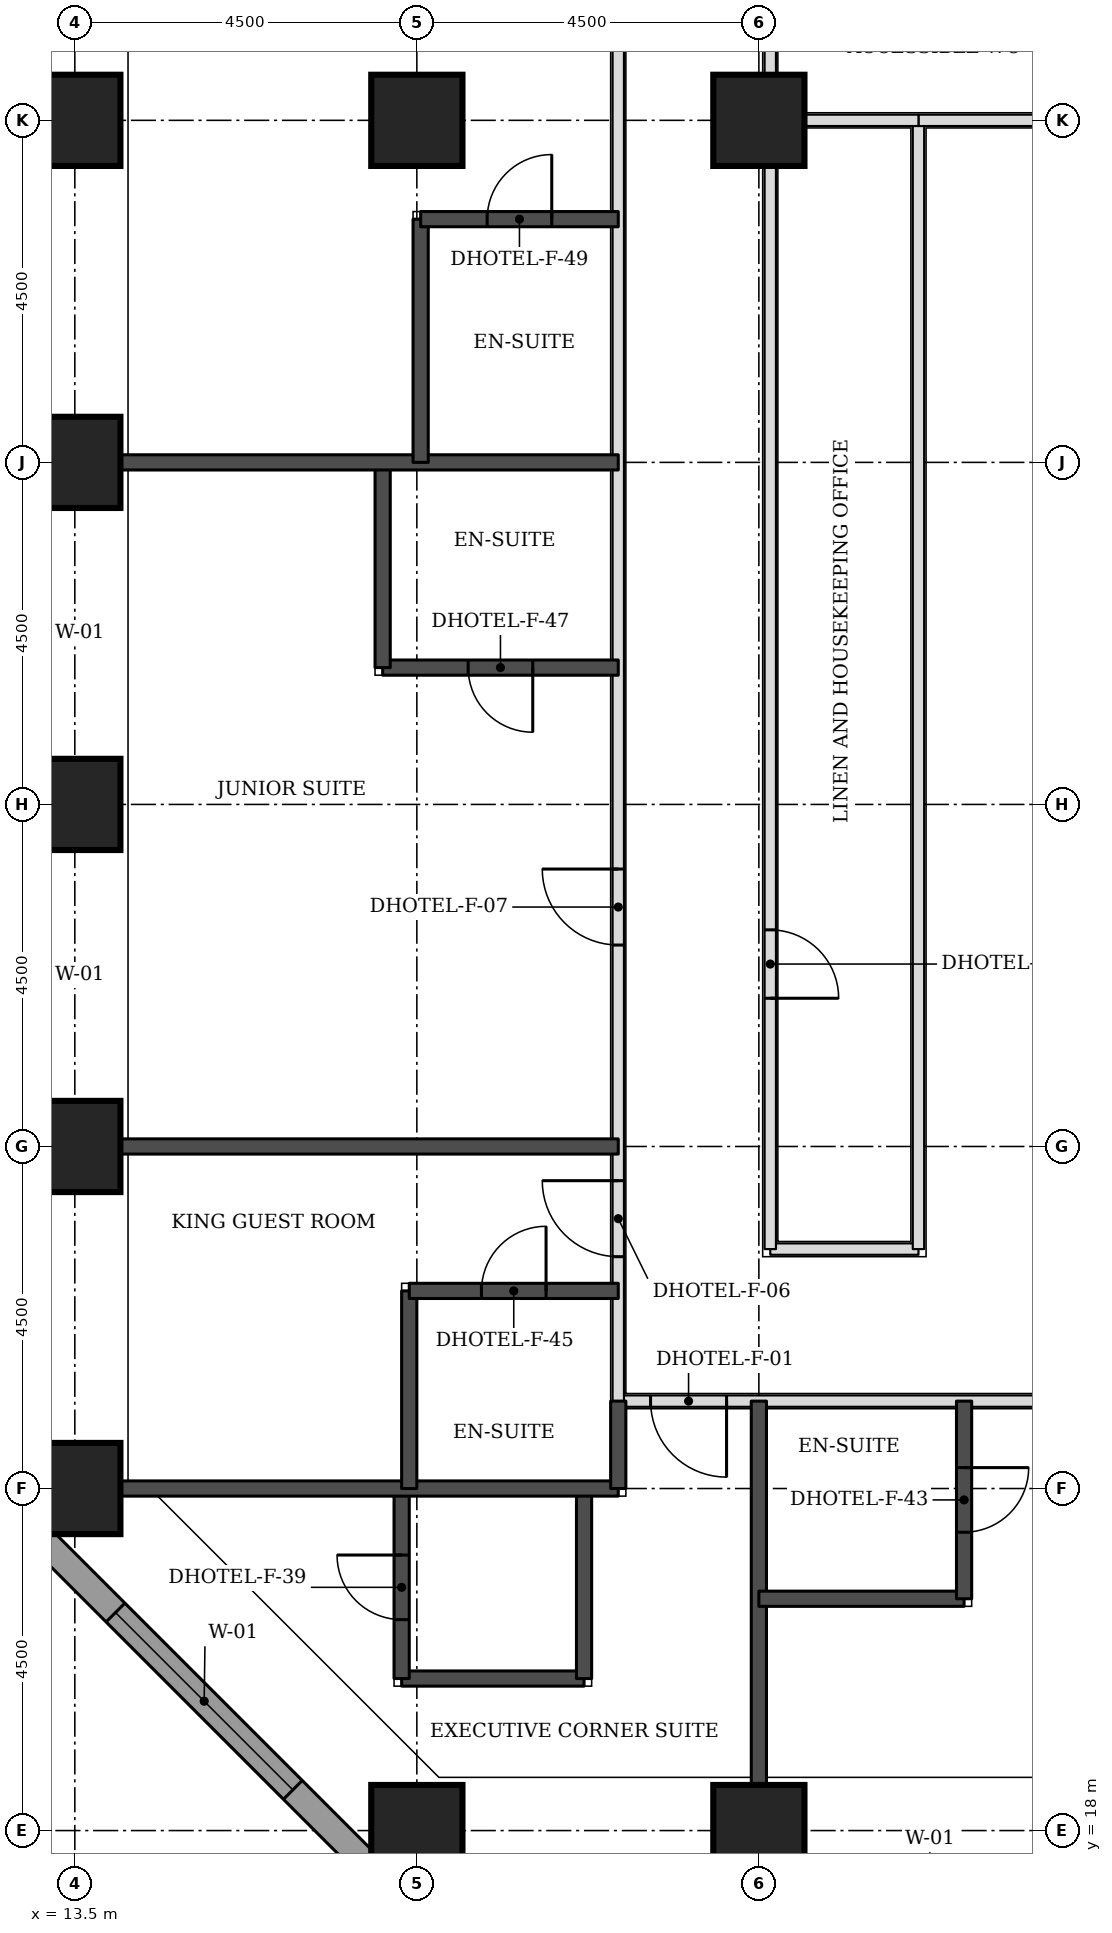
"""IFC4 building model, lengths in metres.
Left out: names, types, materials, properties, quantities, classifications, styles, units other than length and angle.
Written with IfcOpenShell. Run it as: python <this file> out.ifc"""

import sys

from ifc_helpers import new_model, si_unit, direction, frame, frame_2d, origin, origin_2d, place, context, subcontext, project, spatial, rectangle, extrude, element, fill, save


model = new_model("IFC4")
c1 = context("Model", 3, precision=1e-05, world=origin(), true_north=direction((0.0, 1.0)))
c2 = subcontext(c1, "Body", "Model", "MODEL_VIEW")
j1 = project(units=[si_unit("LENGTHUNIT", "METRE"), si_unit("PLANEANGLEUNIT", "RADIAN")], contexts=[c1])
p1 = place(None, origin())
s1 = spatial("IfcSite", under=j1, at=p1, CompositionType="ELEMENT")
p2 = place(p1, origin())
s2 = spatial("IfcBuilding", under=s1, at=p2, CompositionType="ELEMENT")
p3 = place(p2, frame((0.0, 0.0, 42.9)))
s3 = spatial("IfcBuildingStorey", under=s2, at=p3, CompositionType="ELEMENT", Elevation=42.9)
for number, where, z_axis, x_axis in (
    (1, (18.0, 18.0, 0.0), (0.0, 0.0, 1.0), (1.0, 0.0, 0.0)),
    (2, (22.5, 18.0, 0.0), (0.0, 0.0, 1.0), (1.0, 0.0, 0.0)),
    (3, (13.5, 22.5, 0.0), (0.0, 0.0, 1.0), (1.0, 0.0, 0.0)),
    (4, (13.5, 27.0, 0.0), (0.0, 0.0, 1.0), (1.0, 0.0, 0.0)),
    (5, (13.5, 31.5, 0.0), (0.0, 0.0, 1.0), (1.0, 0.0, 0.0)),
    (6, (13.5, 36.0, 0.0), (0.0, 0.0, 1.0), (1.0, 0.0, 0.0)),
    (7, (13.5, 40.5, 0.0), (0.0, 0.0, 1.0), (1.0, 0.0, 0.0)),
    (8, (18.0, 40.5, 0.0), (0.0, 0.0, 1.0), (1.0, 0.0, 0.0)),
    (9, (22.5, 40.5, 0.0), (0.0, 0.0, 1.0), (1.0, 0.0, 0.0)),
):
    element("IfcColumn", number, at=place(p3, frame(where, z_axis=z_axis, x_axis=x_axis)), inside=s3, PredefinedType="COLUMN", context=c2, shape_type="SweptSolid", body=[
        extrude(rectangle(XDim=1.2, YDim=1.2, at=origin_2d()), origin(), (0.0, 0.0, 1.0), 3.3),
    ])
p4 = place(p3, frame((12.674, 22.23, 0.0), z_axis=(0.0, 0.0, 1.0), x_axis=(0.707106781187, -0.707106781187, 0.0)))
e10 = element("IfcWall", 10, at=p4, inside=s3, PredefinedType="STANDARD", context=c2, shape_type="SweptSolid", body=[
    extrude(rectangle(XDim=7.151, YDim=0.35, at=frame_2d((3.576, 0.0))), origin(), (0.0, 0.0, 1.0), 3.055),
])
p5 = place(p4, frame((1.926, 0.0, 0.8)))
e11 = element("IfcOpeningElement", 11, at=p5, cuts=e10, PredefinedType="OPENING", context=c2, shape_type="SweptSolid", body=[
    extrude(rectangle(XDim=3.3, YDim=1.5, at=frame_2d((1.65, 0.75))), frame((0.0, 0.185, 0.0), z_axis=(0.0, -1.0, 0.0), x_axis=(1.0, 0.0, 0.0)), (0.0, 0.0, 1.0), 0.37),
])
p6 = place(p3, frame((20.65, 23.65, 0.0), z_axis=(0.0, 0.0, 1.0), x_axis=(1.0, 0.0, 0.0)))
e12 = element("IfcWall", 12, at=p6, inside=s3, PredefinedType="PARTITIONING", context=c2, shape_type="SweptSolid", body=[
    extrude(rectangle(XDim=30.85, YDim=0.15, at=frame_2d((15.425, 0.0))), origin(), (0.0, 0.0, 1.0), 3.08),
])
p7 = place(p6, frame((7.2, 0.0, 0.0)))
e13 = element("IfcOpeningElement", 13, at=p7, cuts=e12, PredefinedType="OPENING", context=c2, shape_type="SweptSolid", body=[
    extrude(rectangle(XDim=1.0, YDim=2.1, at=frame_2d((0.5, 1.05))), frame((0.0, 0.085, 0.0), z_axis=(0.0, -1.0, 0.0), x_axis=(1.0, 0.0, 0.0)), (0.0, 0.0, 1.0), 0.17),
])
p8 = place(p6, frame((13.25, 0.0, 0.0)))
e14 = element("IfcOpeningElement", 14, at=p8, cuts=e12, PredefinedType="OPENING", context=c2, shape_type="SweptSolid", body=[
    extrude(rectangle(XDim=1.0, YDim=2.1, at=frame_2d((0.5, 1.05))), frame((0.0, 0.085, 0.0), z_axis=(0.0, -1.0, 0.0), x_axis=(1.0, 0.0, 0.0)), (0.0, 0.0, 1.0), 0.17),
])
p9 = place(p6, frame((25.2, 0.0, 0.0)))
e15 = element("IfcOpeningElement", 15, at=p9, cuts=e12, PredefinedType="OPENING", context=c2, shape_type="SweptSolid", body=[
    extrude(rectangle(XDim=1.0, YDim=2.1, at=frame_2d((0.5, 1.05))), frame((0.0, 0.085, 0.0), z_axis=(0.0, -1.0, 0.0), x_axis=(1.0, 0.0, 0.0)), (0.0, 0.0, 1.0), 0.17),
])
p10 = place(p6, frame((0.425, 0.0, 0.0)))
e16 = element("IfcOpeningElement", 16, at=p10, cuts=e12, PredefinedType="OPENING", context=c2, shape_type="SweptSolid", body=[
    extrude(rectangle(XDim=1.0, YDim=2.1, at=frame_2d((0.5, 1.05))), frame((0.0, 0.085, 0.0), z_axis=(0.0, -1.0, 0.0), x_axis=(1.0, 0.0, 0.0)), (0.0, 0.0, 1.0), 0.17),
])
p11 = place(p6, frame((29.35, 0.0, 0.0)))
e17 = element("IfcOpeningElement", 17, at=p11, cuts=e12, PredefinedType="OPENING", context=c2, shape_type="SweptSolid", body=[
    extrude(rectangle(XDim=1.0, YDim=2.1, at=frame_2d((0.5, 1.05))), frame((0.0, 0.085, 0.0), z_axis=(0.0, -1.0, 0.0), x_axis=(1.0, 0.0, 0.0)), (0.0, 0.0, 1.0), 0.17),
])
p12 = place(p3, frame((20.65, 23.65, 0.0), z_axis=(0.0, 0.0, 1.0), x_axis=(0.0, 1.0, 0.0)))
e18 = element("IfcWall", 18, at=p12, inside=s3, PredefinedType="PARTITIONING", context=c2, shape_type="SweptSolid", body=[
    extrude(rectangle(XDim=25.85, YDim=0.15, at=frame_2d((12.925, 0.0))), origin(), (0.0, 0.0, 1.0), 3.08),
])
p13 = place(p12, frame((1.9, 0.0, 0.0)))
e19 = element("IfcOpeningElement", 19, at=p13, cuts=e18, PredefinedType="OPENING", context=c2, shape_type="SweptSolid", body=[
    extrude(rectangle(XDim=1.0, YDim=2.1, at=frame_2d((0.5, 1.05))), frame((0.0, 0.085, 0.0), z_axis=(0.0, -1.0, 0.0), x_axis=(1.0, 0.0, 0.0)), (0.0, 0.0, 1.0), 0.17),
])
p14 = place(p12, frame((6.0, 0.0, 0.0)))
e20 = element("IfcOpeningElement", 20, at=p14, cuts=e18, PredefinedType="OPENING", context=c2, shape_type="SweptSolid", body=[
    extrude(rectangle(XDim=1.0, YDim=2.1, at=frame_2d((0.5, 1.05))), frame((0.0, 0.085, 0.0), z_axis=(0.0, -1.0, 0.0), x_axis=(1.0, 0.0, 0.0)), (0.0, 0.0, 1.0), 0.17),
])
p15 = place(p12, frame((17.95, 0.0, 0.0)))
e21 = element("IfcOpeningElement", 21, at=p15, cuts=e18, PredefinedType="OPENING", context=c2, shape_type="SweptSolid", body=[
    extrude(rectangle(XDim=1.0, YDim=2.1, at=frame_2d((0.5, 1.05))), frame((0.0, 0.085, 0.0), z_axis=(0.0, -1.0, 0.0), x_axis=(1.0, 0.0, 0.0)), (0.0, 0.0, 1.0), 0.17),
])
p16 = place(p12, frame((23.04, 0.0, 0.0)))
e22 = element("IfcOpeningElement", 22, at=p16, cuts=e18, PredefinedType="OPENING", context=c2, shape_type="SweptSolid", body=[
    extrude(rectangle(XDim=0.9, YDim=2.1, at=frame_2d((0.45, 1.05))), frame((0.0, 0.085, 0.0), z_axis=(0.0, -1.0, 0.0), x_axis=(1.0, 0.0, 0.0)), (0.0, 0.0, 1.0), 0.17),
])
p17 = place(p3, frame((22.65, 25.65, 0.0), z_axis=(0.0, 0.0, 1.0), x_axis=(1.0, 0.0, 0.0)))
e23 = element("IfcWall", 23, at=p17, inside=s3, PredefinedType="PARTITIONING", context=c2, shape_type="SweptSolid", body=[
    extrude(rectangle(XDim=1.95, YDim=0.15, at=frame_2d((0.975, 0.0))), origin(), (0.0, 0.0, 1.0), 3.08),
])
p18 = place(p3, frame((22.65, 25.65, 0.0), z_axis=(0.0, 0.0, 1.0), x_axis=(0.0, 1.0, 0.0)))
e24 = element("IfcWall", 24, at=p18, inside=s3, PredefinedType="PARTITIONING", context=c2, shape_type="SweptSolid", body=[
    extrude(rectangle(XDim=17.35, YDim=0.15, at=frame_2d((8.675, 0.0))), origin(), (0.0, 0.0, 1.0), 3.08),
])
p19 = place(p18, frame((3.3, 0.0, 0.0)))
e25 = element("IfcOpeningElement", 25, at=p19, cuts=e24, PredefinedType="OPENING", context=c2, shape_type="SweptSolid", body=[
    extrude(rectangle(XDim=0.9, YDim=2.1, at=frame_2d((0.45, 1.05))), frame((0.0, 0.085, 0.0), z_axis=(0.0, -1.0, 0.0), x_axis=(1.0, 0.0, 0.0)), (0.0, 0.0, 1.0), 0.17),
])
p20 = place(p3, frame((24.6, 25.65, 0.0), z_axis=(0.0, 0.0, 1.0), x_axis=(0.0, 1.0, 0.0)))
e26 = element("IfcWall", 26, at=p20, inside=s3, PredefinedType="PARTITIONING", context=c2, shape_type="SweptSolid", body=[
    extrude(rectangle(XDim=14.85, YDim=0.15, at=frame_2d((7.425, 0.0))), origin(), (0.0, 0.0, 1.0), 3.08),
])
p21 = place(p3, frame((24.6, 40.5, 0.0), z_axis=(0.0, 0.0, 1.0), x_axis=(1.0, 0.0, 0.0)))
e27 = element("IfcWall", 27, at=p21, inside=s3, PredefinedType="PARTITIONING", context=c2, shape_type="SweptSolid", body=[
    extrude(rectangle(XDim=2.35, YDim=0.15, at=frame_2d((1.175, 0.0))), origin(), (0.0, 0.0, 1.0), 2.33),
])
p22 = place(p3, frame((22.5, 18.6, 0.0), z_axis=(0.0, 0.0, 1.0), x_axis=(0.0, 1.0, 0.0)))
e28 = element("IfcWall", 28, at=p22, inside=s3, PredefinedType="SOLIDWALL", context=c2, shape_type="SweptSolid", body=[
    extrude(rectangle(XDim=5.05, YDim=0.2, at=frame_2d((2.525, 0.0))), origin(), (0.0, 0.0, 1.0), 3.08),
])
p23 = place(p3, frame((17.8, 20.0, 0.0), z_axis=(0.0, 0.0, 1.0), x_axis=(1.0, 0.0, 0.0)))
e29 = element("IfcWall", 29, at=p23, inside=s3, PredefinedType="SOLIDWALL", context=c2, shape_type="SweptSolid", body=[
    extrude(rectangle(XDim=2.4, YDim=0.2, at=frame_2d((1.2, 0.0))), origin(), (0.0, 0.0, 1.0), 3.08),
])
p24 = place(p3, frame((17.8, 20.0, 0.0), z_axis=(0.0, 0.0, 1.0), x_axis=(0.0, 1.0, 0.0)))
e30 = element("IfcWall", 30, at=p24, inside=s3, PredefinedType="SOLIDWALL", context=c2, shape_type="SweptSolid", body=[
    extrude(rectangle(XDim=2.5, YDim=0.2, at=frame_2d((1.25, 0.0))), origin(), (0.0, 0.0, 1.0), 3.08),
])
p25 = place(p24, frame((0.775, 0.0, 0.0)))
e31 = element("IfcOpeningElement", 31, at=p25, cuts=e30, PredefinedType="OPENING", context=c2, shape_type="SweptSolid", body=[
    extrude(rectangle(XDim=0.85, YDim=2.1, at=frame_2d((0.425, 1.05))), frame((0.0, 0.11, 0.0), z_axis=(0.0, -1.0, 0.0), x_axis=(1.0, 0.0, 0.0)), (0.0, 0.0, 1.0), 0.22),
])
p26 = place(p3, frame((20.2, 20.0, 0.0), z_axis=(0.0, 0.0, 1.0), x_axis=(0.0, 1.0, 0.0)))
e32 = element("IfcWall", 32, at=p26, inside=s3, PredefinedType="SOLIDWALL", context=c2, shape_type="SweptSolid", body=[
    extrude(rectangle(XDim=2.5, YDim=0.2, at=frame_2d((1.25, 0.0))), origin(), (0.0, 0.0, 1.0), 3.08),
])
p27 = place(p3, frame((22.5, 21.05, 0.0), z_axis=(0.0, 0.0, 1.0), x_axis=(1.0, 0.0, 0.0)))
e33 = element("IfcWall", 33, at=p27, inside=s3, PredefinedType="SOLIDWALL", context=c2, shape_type="SweptSolid", body=[
    extrude(rectangle(XDim=2.7, YDim=0.2, at=frame_2d((1.35, 0.0))), origin(), (0.0, 0.0, 1.0), 3.08),
])
p28 = place(p3, frame((25.2, 21.05, 0.0), z_axis=(0.0, 0.0, 1.0), x_axis=(0.0, 1.0, 0.0)))
e34 = element("IfcWall", 34, at=p28, inside=s3, PredefinedType="SOLIDWALL", context=c2, shape_type="SweptSolid", body=[
    extrude(rectangle(XDim=2.6, YDim=0.2, at=frame_2d((1.3, 0.0))), origin(), (0.0, 0.0, 1.0), 3.08),
])
p29 = place(p28, frame((0.875, 0.0, 0.0)))
e35 = element("IfcOpeningElement", 35, at=p29, cuts=e34, PredefinedType="OPENING", context=c2, shape_type="SweptSolid", body=[
    extrude(rectangle(XDim=0.85, YDim=2.1, at=frame_2d((0.425, 1.05))), frame((0.0, 0.11, 0.0), z_axis=(0.0, -1.0, 0.0), x_axis=(1.0, 0.0, 0.0)), (0.0, 0.0, 1.0), 0.22),
])
p30 = place(p3, frame((14.1, 22.5, 0.0), z_axis=(0.0, 0.0, 1.0), x_axis=(1.0, 0.0, 0.0)))
e36 = element("IfcWall", 36, at=p30, inside=s3, PredefinedType="SOLIDWALL", context=c2, shape_type="SweptSolid", body=[
    extrude(rectangle(XDim=6.55, YDim=0.2, at=frame_2d((3.275, 0.0))), origin(), (0.0, 0.0, 1.0), 3.08),
])
p31 = place(p3, frame((17.9, 22.5, 0.0), z_axis=(0.0, 0.0, 1.0), x_axis=(0.0, 1.0, 0.0)))
e37 = element("IfcWall", 37, at=p31, inside=s3, PredefinedType="SOLIDWALL", context=c2, shape_type="SweptSolid", body=[
    extrude(rectangle(XDim=2.6, YDim=0.2, at=frame_2d((1.3, 0.0))), origin(), (0.0, 0.0, 1.0), 3.08),
])
p32 = place(p3, frame((20.65, 22.5, 0.0), z_axis=(0.0, 0.0, 1.0), x_axis=(0.0, 1.0, 0.0)))
e38 = element("IfcWall", 38, at=p32, inside=s3, PredefinedType="SOLIDWALL", context=c2, shape_type="SweptSolid", body=[
    extrude(rectangle(XDim=1.15, YDim=0.2, at=frame_2d((0.575, 0.0))), origin(), (0.0, 0.0, 1.0), 3.08),
])
p33 = place(p3, frame((17.9, 25.1, 0.0), z_axis=(0.0, 0.0, 1.0), x_axis=(1.0, 0.0, 0.0)))
e39 = element("IfcWall", 39, at=p33, inside=s3, PredefinedType="SOLIDWALL", context=c2, shape_type="SweptSolid", body=[
    extrude(rectangle(XDim=2.75, YDim=0.2, at=frame_2d((1.375, 0.0))), origin(), (0.0, 0.0, 1.0), 3.08),
])
p34 = place(p33, frame((0.95, 0.0, 0.0)))
e40 = element("IfcOpeningElement", 40, at=p34, cuts=e39, PredefinedType="OPENING", context=c2, shape_type="SweptSolid", body=[
    extrude(rectangle(XDim=0.85, YDim=2.1, at=frame_2d((0.425, 1.05))), frame((0.0, 0.11, 0.0), z_axis=(0.0, -1.0, 0.0), x_axis=(1.0, 0.0, 0.0)), (0.0, 0.0, 1.0), 0.22),
])
p35 = place(p3, frame((14.1, 27.0, 0.0), z_axis=(0.0, 0.0, 1.0), x_axis=(1.0, 0.0, 0.0)))
e41 = element("IfcWall", 41, at=p35, inside=s3, PredefinedType="SOLIDWALL", context=c2, shape_type="SweptSolid", body=[
    extrude(rectangle(XDim=6.55, YDim=0.2, at=frame_2d((3.275, 0.0))), origin(), (0.0, 0.0, 1.0), 3.08),
])
p36 = place(p3, frame((17.55, 33.3, 0.0), z_axis=(0.0, 0.0, 1.0), x_axis=(1.0, 0.0, 0.0)))
e42 = element("IfcWall", 42, at=p36, inside=s3, PredefinedType="SOLIDWALL", context=c2, shape_type="SweptSolid", body=[
    extrude(rectangle(XDim=3.1, YDim=0.2, at=frame_2d((1.55, 0.0))), origin(), (0.0, 0.0, 1.0), 3.08),
])
p37 = place(p36, frame((1.125, 0.0, 0.0)))
e43 = element("IfcOpeningElement", 43, at=p37, cuts=e42, PredefinedType="OPENING", context=c2, shape_type="SweptSolid", body=[
    extrude(rectangle(XDim=0.85, YDim=2.1, at=frame_2d((0.425, 1.05))), frame((0.0, 0.11, 0.0), z_axis=(0.0, -1.0, 0.0), x_axis=(1.0, 0.0, 0.0)), (0.0, 0.0, 1.0), 0.22),
])
p38 = place(p3, frame((17.55, 33.3, 0.0), z_axis=(0.0, 0.0, 1.0), x_axis=(0.0, 1.0, 0.0)))
e44 = element("IfcWall", 44, at=p38, inside=s3, PredefinedType="SOLIDWALL", context=c2, shape_type="SweptSolid", body=[
    extrude(rectangle(XDim=2.7, YDim=0.2, at=frame_2d((1.35, 0.0))), origin(), (0.0, 0.0, 1.0), 3.08),
])
p39 = place(p3, frame((14.1, 36.0, 0.0), z_axis=(0.0, 0.0, 1.0), x_axis=(1.0, 0.0, 0.0)))
e45 = element("IfcWall", 45, at=p39, inside=s3, PredefinedType="SOLIDWALL", context=c2, shape_type="SweptSolid", body=[
    extrude(rectangle(XDim=6.55, YDim=0.2, at=frame_2d((3.275, 0.0))), origin(), (0.0, 0.0, 1.0), 3.08),
])
p40 = place(p3, frame((18.05, 36.0, 0.0), z_axis=(0.0, 0.0, 1.0), x_axis=(0.0, 1.0, 0.0)))
e46 = element("IfcWall", 46, at=p40, inside=s3, PredefinedType="SOLIDWALL", context=c2, shape_type="SweptSolid", body=[
    extrude(rectangle(XDim=3.2, YDim=0.2, at=frame_2d((1.6, 0.0))), origin(), (0.0, 0.0, 1.0), 3.08),
])
p41 = place(p3, frame((18.05, 39.2, 0.0), z_axis=(0.0, 0.0, 1.0), x_axis=(1.0, 0.0, 0.0)))
e47 = element("IfcWall", 47, at=p41, inside=s3, PredefinedType="SOLIDWALL", context=c2, shape_type="SweptSolid", body=[
    extrude(rectangle(XDim=2.6, YDim=0.2, at=frame_2d((1.3, 0.0))), origin(), (0.0, 0.0, 1.0), 3.08),
])
p42 = place(p41, frame((0.875, 0.0, 0.0)))
e48 = element("IfcOpeningElement", 48, at=p42, cuts=e47, PredefinedType="OPENING", context=c2, shape_type="SweptSolid", body=[
    extrude(rectangle(XDim=0.85, YDim=2.1, at=frame_2d((0.425, 1.05))), frame((0.0, 0.11, 0.0), z_axis=(0.0, -1.0, 0.0), x_axis=(1.0, 0.0, 0.0)), (0.0, 0.0, 1.0), 0.22),
])
p43 = place(p3, frame((22.65, 40.5, 0.0), z_axis=(0.0, 0.0, 1.0), x_axis=(1.0, 0.0, 0.0)))
e49 = element("IfcWall", 49, at=p43, inside=s3, PredefinedType="PARTITIONING", context=c2, shape_type="SweptSolid", body=[
    extrude(rectangle(XDim=1.95, YDim=0.15, at=frame_2d((0.975, 0.0))), origin(), (0.0, 0.0, 1.0), 2.33),
])
p44 = place(p5, origin())
e50 = element("IfcWindow", 50, at=p44, inside=s3, PartitioningType="SINGLE_PANEL", PredefinedType="WINDOW", context=c2, shape_type="SweptSolid", body=[
    extrude(rectangle(XDim=3.3, YDim=1.5, at=frame_2d((1.65, 0.75))), frame((0.0, 0.085, 0.0), z_axis=(0.0, -1.0, 0.0), x_axis=(1.0, 0.0, 0.0)), (0.0, 0.0, 1.0), 0.06),
])
fill(e11, e50)
p45 = place(p29, frame((0.85, 0.0, 0.0), z_axis=(0.0, 0.0, 1.0), x_axis=(-1.0, 0.0, 0.0)))
e51 = element("IfcDoor", 51, at=p45, inside=s3, OperationType="SINGLE_SWING_LEFT", PredefinedType="DOOR", context=c2, shape_type="SweptSolid", body=[
    extrude(rectangle(XDim=0.85, YDim=2.1, at=frame_2d((0.425, 1.05))), frame((0.0, 0.025, 0.0), z_axis=(0.0, -1.0, 0.0), x_axis=(1.0, 0.0, 0.0)), (0.0, 0.0, 1.0), 0.05),
])
fill(e35, e51)
p46 = place(p13, origin())
e52 = element("IfcDoor", 52, at=p46, inside=s3, OperationType="SINGLE_SWING_RIGHT", PredefinedType="DOOR", context=c2, shape_type="SweptSolid", body=[
    extrude(rectangle(XDim=1.0, YDim=2.1, at=frame_2d((0.5, 1.05))), frame((0.0, 0.025, 0.0), z_axis=(0.0, -1.0, 0.0), x_axis=(1.0, 0.0, 0.0)), (0.0, 0.0, 1.0), 0.05),
])
fill(e19, e52)
p47 = place(p34, origin())
e53 = element("IfcDoor", 53, at=p47, inside=s3, OperationType="SINGLE_SWING_RIGHT", PredefinedType="DOOR", context=c2, shape_type="SweptSolid", body=[
    extrude(rectangle(XDim=0.85, YDim=2.1, at=frame_2d((0.425, 1.05))), frame((0.0, 0.025, 0.0), z_axis=(0.0, -1.0, 0.0), x_axis=(1.0, 0.0, 0.0)), (0.0, 0.0, 1.0), 0.05),
])
fill(e40, e53)
p48 = place(p14, origin())
e54 = element("IfcDoor", 54, at=p48, inside=s3, OperationType="SINGLE_SWING_RIGHT", PredefinedType="DOOR", context=c2, shape_type="SweptSolid", body=[
    extrude(rectangle(XDim=1.0, YDim=2.1, at=frame_2d((0.5, 1.05))), frame((0.0, 0.025, 0.0), z_axis=(0.0, -1.0, 0.0), x_axis=(1.0, 0.0, 0.0)), (0.0, 0.0, 1.0), 0.05),
])
fill(e20, e54)
p49 = place(p37, frame((0.85, 0.0, 0.0), z_axis=(0.0, 0.0, 1.0), x_axis=(-1.0, 0.0, 0.0)))
e55 = element("IfcDoor", 55, at=p49, inside=s3, OperationType="SINGLE_SWING_LEFT", PredefinedType="DOOR", context=c2, shape_type="SweptSolid", body=[
    extrude(rectangle(XDim=0.85, YDim=2.1, at=frame_2d((0.425, 1.05))), frame((0.0, 0.025, 0.0), z_axis=(0.0, -1.0, 0.0), x_axis=(1.0, 0.0, 0.0)), (0.0, 0.0, 1.0), 0.05),
])
fill(e43, e55)
p50 = place(p42, origin())
e56 = element("IfcDoor", 56, at=p50, inside=s3, OperationType="SINGLE_SWING_RIGHT", PredefinedType="DOOR", context=c2, shape_type="SweptSolid", body=[
    extrude(rectangle(XDim=0.85, YDim=2.1, at=frame_2d((0.425, 1.05))), frame((0.0, 0.025, 0.0), z_axis=(0.0, -1.0, 0.0), x_axis=(1.0, 0.0, 0.0)), (0.0, 0.0, 1.0), 0.05),
])
fill(e48, e56)
p51 = place(p10, frame((1.0, 0.0, 0.0), z_axis=(0.0, 0.0, 1.0), x_axis=(-1.0, 0.0, 0.0)))
e57 = element("IfcDoor", 57, at=p51, inside=s3, OperationType="SINGLE_SWING_LEFT", PredefinedType="DOOR", context=c2, shape_type="SweptSolid", body=[
    extrude(rectangle(XDim=1.0, YDim=2.1, at=frame_2d((0.5, 1.05))), frame((0.0, 0.025, 0.0), z_axis=(0.0, -1.0, 0.0), x_axis=(1.0, 0.0, 0.0)), (0.0, 0.0, 1.0), 0.05),
])
fill(e16, e57)
p52 = place(p25, origin())
e58 = element("IfcDoor", 58, at=p52, inside=s3, OperationType="SINGLE_SWING_RIGHT", PredefinedType="DOOR", context=c2, shape_type="SweptSolid", body=[
    extrude(rectangle(XDim=0.85, YDim=2.1, at=frame_2d((0.425, 1.05))), frame((0.0, 0.025, 0.0), z_axis=(0.0, -1.0, 0.0), x_axis=(1.0, 0.0, 0.0)), (0.0, 0.0, 1.0), 0.05),
])
fill(e31, e58)
p53 = place(p19, frame((0.9, 0.0, 0.0), z_axis=(0.0, 0.0, 1.0), x_axis=(-1.0, 0.0, 0.0)))
e59 = element("IfcDoor", 59, at=p53, inside=s3, OperationType="SINGLE_SWING_RIGHT", PredefinedType="DOOR", context=c2, shape_type="SweptSolid", body=[
    extrude(rectangle(XDim=0.9, YDim=2.1, at=frame_2d((0.45, 1.05))), frame((0.0, 0.025, 0.0), z_axis=(0.0, -1.0, 0.0), x_axis=(1.0, 0.0, 0.0)), (0.0, 0.0, 1.0), 0.05),
])
fill(e25, e59)
save(model, sys.argv[1])
